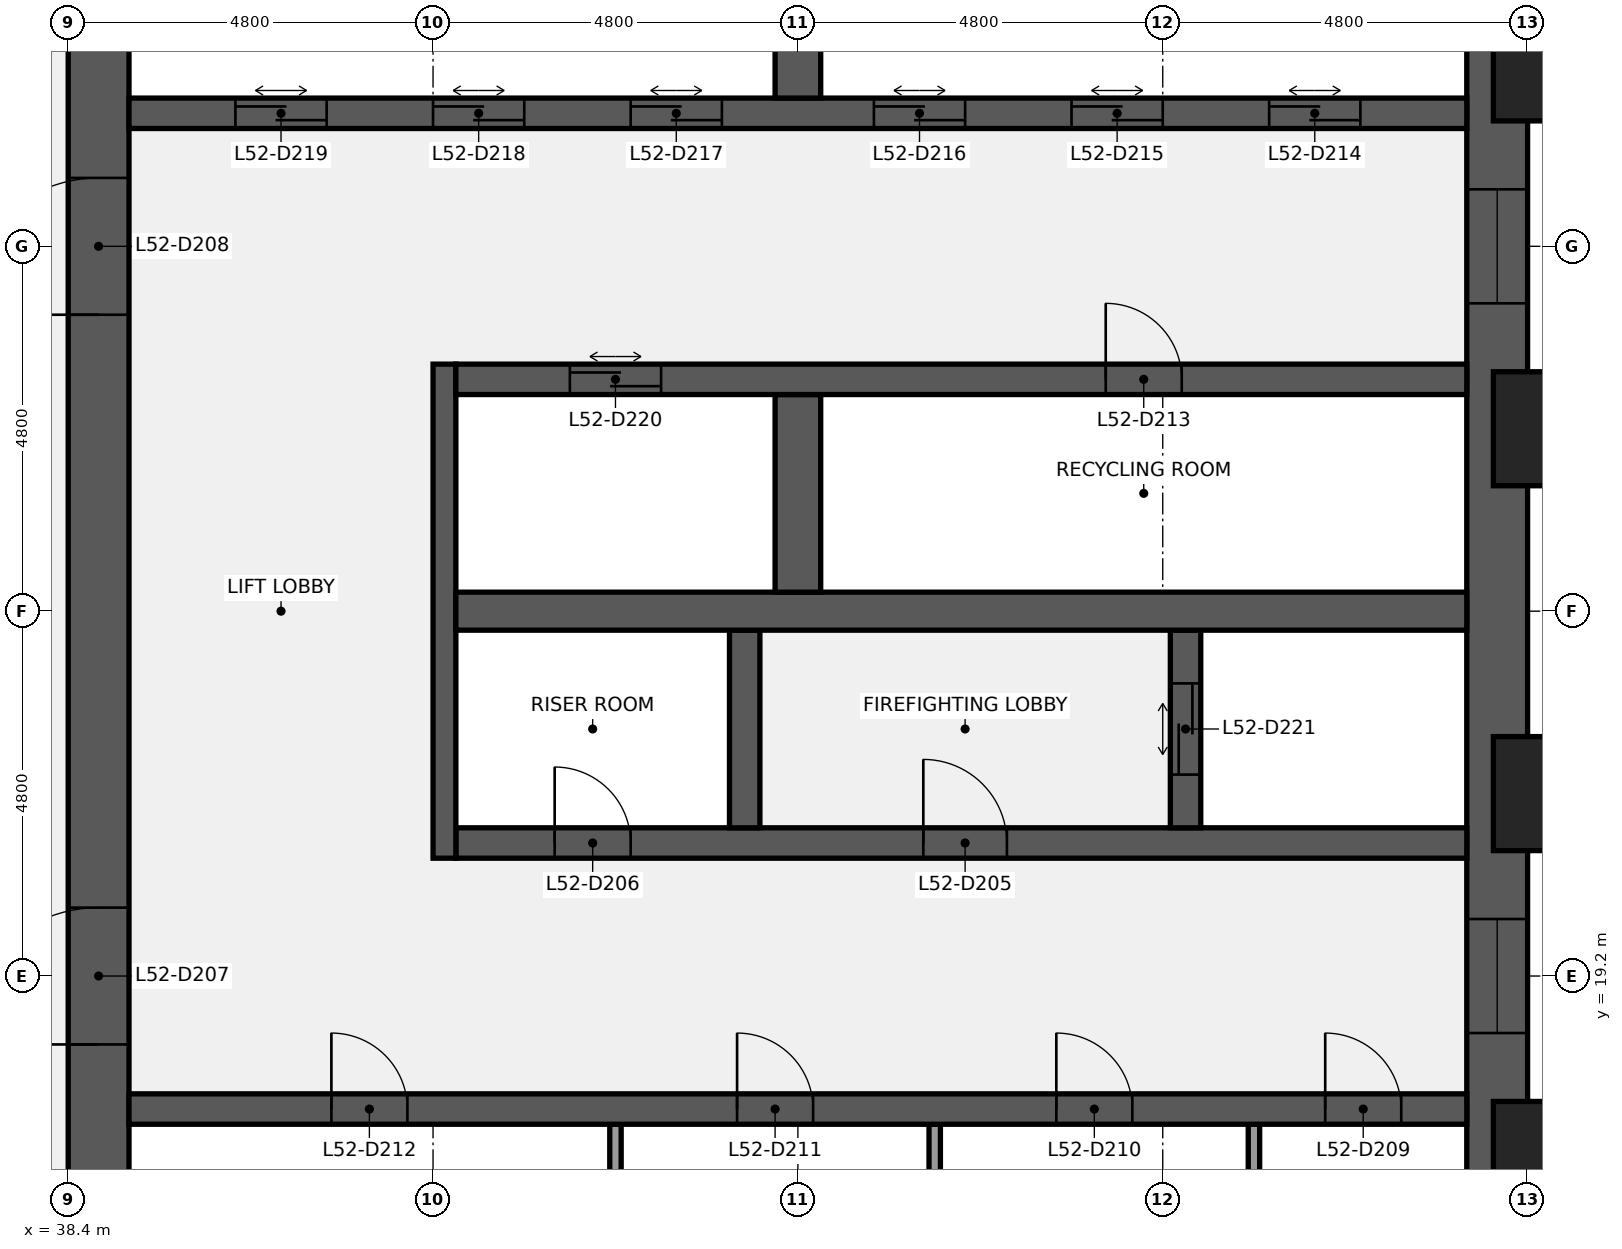
"""IFC4 building model, lengths in metres.
Left out: names, types, materials, properties, quantities, classifications, styles, units other than length and angle.
Written with IfcOpenShell. Run it as: python <this file> out.ifc"""

import sys

from ifc_helpers import new_model, si_unit, direction, frame, frame_2d, origin, origin_2d, place, context, subcontext, project, spatial, rectangle, extrude, element, fill, save


model = new_model("IFC4")
c1 = context("Model", 3, precision=1e-05, world=origin(), true_north=direction((0.0, 1.0)))
c2 = subcontext(c1, "Body", "Model", "MODEL_VIEW")
j1 = project(units=[si_unit("LENGTHUNIT", "METRE"), si_unit("PLANEANGLEUNIT", "RADIAN")], contexts=[c1])
p1 = place(None, origin())
s1 = spatial("IfcSite", under=j1, at=p1, CompositionType="ELEMENT")
p2 = place(p1, origin())
s2 = spatial("IfcBuilding", under=s1, at=p2, CompositionType="ELEMENT")
p3 = place(p2, frame((0.0, 0.0, 237.2)))
s3 = spatial("IfcBuildingStorey", under=s2, at=p3, CompositionType="ELEMENT", Elevation=237.2)
p4 = place(p3, frame((57.2, 38.4, 0.0), z_axis=(0.0, 0.0, 1.0), x_axis=(0.0, -1.0, 0.0)))
e1 = element("IfcWall", 1, at=p4, inside=s3, PredefinedType="SHEAR", context=c2, shape_type="SweptSolid", body=[
    extrude(rectangle(XDim=28.8, YDim=0.8, at=frame_2d((14.4, 0.0))), origin(), (0.0, 0.0, 1.0), 3.84),
])
p5 = place(p4, frame((18.45, 0.0, 0.9)))
e2 = element("IfcOpeningElement", 2, at=p5, cuts=e1, PredefinedType="OPENING", context=c2, shape_type="SweptSolid", body=[
    extrude(rectangle(XDim=1.5, YDim=1.5, at=frame_2d((0.75, 0.75))), frame((0.0, 0.41, 0.0), z_axis=(0.0, -1.0, 0.0), x_axis=(1.0, 0.0, 0.0)), (0.0, 0.0, 1.0), 0.82),
])
p6 = place(p4, frame((8.85, 0.0, 0.9)))
e3 = element("IfcOpeningElement", 3, at=p6, cuts=e1, PredefinedType="OPENING", context=c2, shape_type="SweptSolid", body=[
    extrude(rectangle(XDim=1.5, YDim=1.5, at=frame_2d((0.75, 0.75))), frame((0.0, 0.41, 0.0), z_axis=(0.0, -1.0, 0.0), x_axis=(1.0, 0.0, 0.0)), (0.0, 0.0, 1.0), 0.82),
])
p7 = place(p3, frame((38.8, 9.6, 0.0), z_axis=(0.0, 0.0, 1.0), x_axis=(0.0, 1.0, 0.0)))
e4 = element("IfcWall", 4, at=p7, inside=s3, PredefinedType="SHEAR", context=c2, shape_type="SweptSolid", body=[
    extrude(rectangle(XDim=28.8, YDim=0.8, at=frame_2d((14.4, 0.0))), origin(), (0.0, 0.0, 1.0), 3.84),
])
p8 = place(p7, frame((8.7, 0.0, 0.0)))
e5 = element("IfcOpeningElement", 5, at=p8, cuts=e4, PredefinedType="OPENING", context=c2, shape_type="SweptSolid", body=[
    extrude(rectangle(XDim=1.8, YDim=2.1, at=frame_2d((0.9, 1.05))), frame((0.0, 0.41, 0.0), z_axis=(0.0, -1.0, 0.0), x_axis=(1.0, 0.0, 0.0)), (0.0, 0.0, 1.0), 0.82),
])
p9 = place(p7, frame((18.3, 0.0, 0.0)))
e6 = element("IfcOpeningElement", 6, at=p9, cuts=e4, PredefinedType="OPENING", context=c2, shape_type="SweptSolid", body=[
    extrude(rectangle(XDim=1.8, YDim=2.1, at=frame_2d((0.9, 1.05))), frame((0.0, 0.41, 0.0), z_axis=(0.0, -1.0, 0.0), x_axis=(1.0, 0.0, 0.0)), (0.0, 0.0, 1.0), 0.82),
])
for number, where, z_axis, x_axis in (
    (7, (54.0, 14.65, 0.0), (0.0, 0.0, 1.0), (0.0, 1.0, 0.0)),
    (8, (49.8, 14.65, 0.0), (0.0, 0.0, 1.0), (0.0, 1.0, 0.0)),
    (9, (45.6, 14.65, 0.0), (0.0, 0.0, 1.0), (0.0, 1.0, 0.0)),
):
    element("IfcWall", number, at=place(p3, frame(where, z_axis=z_axis, x_axis=x_axis)), inside=s3, PredefinedType="PARTITIONING", context=c2, shape_type="SweptSolid", body=[
        extrude(rectangle(XDim=2.6, YDim=0.15, at=frame_2d((1.3, 0.0))), origin(), (0.0, 0.0, 1.0), 3.84),
    ])
p10 = place(p3, frame((39.2, 17.45, 0.0), z_axis=(0.0, 0.0, 1.0), x_axis=(1.0, 0.0, 0.0)))
e10 = element("IfcWall", 10, at=p10, inside=s3, PredefinedType="SHEAR", context=c2, shape_type="SweptSolid", body=[
    extrude(rectangle(XDim=17.6, YDim=0.4, at=frame_2d((8.8, 0.0))), origin(), (0.0, 0.0, 1.0), 3.84),
])
p11 = place(p10, frame((15.738, 0.0, 0.0)))
e11 = element("IfcOpeningElement", 11, at=p11, cuts=e10, PredefinedType="OPENING", context=c2, shape_type="SweptSolid", body=[
    extrude(rectangle(XDim=1.0, YDim=2.1, at=frame_2d((0.5, 1.05))), frame((0.0, 0.21, 0.0), z_axis=(0.0, -1.0, 0.0), x_axis=(1.0, 0.0, 0.0)), (0.0, 0.0, 1.0), 0.42),
])
p12 = place(p10, frame((12.2, 0.0, 0.0)))
e12 = element("IfcOpeningElement", 12, at=p12, cuts=e10, PredefinedType="OPENING", context=c2, shape_type="SweptSolid", body=[
    extrude(rectangle(XDim=1.0, YDim=2.1, at=frame_2d((0.5, 1.05))), frame((0.0, 0.21, 0.0), z_axis=(0.0, -1.0, 0.0), x_axis=(1.0, 0.0, 0.0)), (0.0, 0.0, 1.0), 0.42),
])
p13 = place(p10, frame((8.0, 0.0, 0.0)))
e13 = element("IfcOpeningElement", 13, at=p13, cuts=e10, PredefinedType="OPENING", context=c2, shape_type="SweptSolid", body=[
    extrude(rectangle(XDim=1.0, YDim=2.1, at=frame_2d((0.5, 1.05))), frame((0.0, 0.21, 0.0), z_axis=(0.0, -1.0, 0.0), x_axis=(1.0, 0.0, 0.0)), (0.0, 0.0, 1.0), 0.42),
])
p14 = place(p10, frame((2.663, 0.0, 0.0)))
e14 = element("IfcOpeningElement", 14, at=p14, cuts=e10, PredefinedType="OPENING", context=c2, shape_type="SweptSolid", body=[
    extrude(rectangle(XDim=1.0, YDim=2.1, at=frame_2d((0.5, 1.05))), frame((0.0, 0.21, 0.0), z_axis=(0.0, -1.0, 0.0), x_axis=(1.0, 0.0, 0.0)), (0.0, 0.0, 1.0), 0.42),
])
p15 = place(p3, frame((43.5, 20.95, 0.0), z_axis=(0.0, 0.0, 1.0), x_axis=(1.0, 0.0, 0.0)))
e15 = element("IfcWall", 15, at=p15, inside=s3, PredefinedType="SHEAR", context=c2, shape_type="SweptSolid", body=[
    extrude(rectangle(XDim=13.3, YDim=0.4, at=frame_2d((6.65, 0.0))), origin(), (0.0, 0.0, 1.0), 3.84),
])
p16 = place(p15, frame((6.15, 0.0, 0.0)))
e16 = element("IfcOpeningElement", 16, at=p16, cuts=e15, PredefinedType="OPENING", context=c2, shape_type="SweptSolid", body=[
    extrude(rectangle(XDim=1.1, YDim=2.1, at=frame_2d((0.55, 1.05))), frame((0.0, 0.21, 0.0), z_axis=(0.0, -1.0, 0.0), x_axis=(1.0, 0.0, 0.0)), (0.0, 0.0, 1.0), 0.42),
])
p17 = place(p15, frame((1.3, 0.0, 0.0)))
e17 = element("IfcOpeningElement", 17, at=p17, cuts=e15, PredefinedType="OPENING", context=c2, shape_type="SweptSolid", body=[
    extrude(rectangle(XDim=1.0, YDim=2.1, at=frame_2d((0.5, 1.05))), frame((0.0, 0.21, 0.0), z_axis=(0.0, -1.0, 0.0), x_axis=(1.0, 0.0, 0.0)), (0.0, 0.0, 1.0), 0.42),
])
p18 = place(p3, frame((43.35, 20.75, 0.0), z_axis=(0.0, 0.0, 1.0), x_axis=(0.0, 1.0, 0.0)))
e18 = element("IfcWall", 18, at=p18, inside=s3, PredefinedType="SHEAR", context=c2, shape_type="SweptSolid", body=[
    extrude(rectangle(XDim=6.5, YDim=0.3, at=frame_2d((3.25, 0.0))), origin(), (0.0, 0.0, 1.0), 3.84),
])
p19 = place(p3, frame((53.1, 21.15, 0.0), z_axis=(0.0, 0.0, 1.0), x_axis=(0.0, 1.0, 0.0)))
e19 = element("IfcWall", 19, at=p19, inside=s3, PredefinedType="SHEAR", context=c2, shape_type="SweptSolid", body=[
    extrude(rectangle(XDim=2.6, YDim=0.4, at=frame_2d((1.3, 0.0))), origin(), (0.0, 0.0, 1.0), 3.84),
])
p20 = place(p19, frame((0.7, 0.0, 0.0)))
e20 = element("IfcOpeningElement", 20, at=p20, cuts=e19, PredefinedType="OPENING", context=c2, shape_type="SweptSolid", body=[
    extrude(rectangle(XDim=1.2, YDim=2.1, at=frame_2d((0.6, 1.05))), frame((0.0, 0.21, 0.0), z_axis=(0.0, -1.0, 0.0), x_axis=(1.0, 0.0, 0.0)), (0.0, 0.0, 1.0), 0.42),
])
p21 = place(p3, frame((47.3, 21.15, 0.0), z_axis=(0.0, 0.0, 1.0), x_axis=(0.0, 1.0, 0.0)))
e21 = element("IfcWall", 21, at=p21, inside=s3, PredefinedType="SHEAR", context=c2, shape_type="SweptSolid", body=[
    extrude(rectangle(XDim=2.6, YDim=0.4, at=frame_2d((1.3, 0.0))), origin(), (0.0, 0.0, 1.0), 3.84),
])
p22 = place(p3, frame((43.5, 24.0, 0.0), z_axis=(0.0, 0.0, 1.0), x_axis=(1.0, 0.0, 0.0)))
e22 = element("IfcWall", 22, at=p22, inside=s3, PredefinedType="SHEAR", context=c2, shape_type="SweptSolid", body=[
    extrude(rectangle(XDim=13.3, YDim=0.5, at=frame_2d((6.65, 0.0))), origin(), (0.0, 0.0, 1.0), 3.84),
])
p23 = place(p3, frame((48.0, 24.25, 0.0), z_axis=(0.0, 0.0, 1.0), x_axis=(0.0, 1.0, 0.0)))
e23 = element("IfcWall", 23, at=p23, inside=s3, PredefinedType="SHEAR", context=c2, shape_type="SweptSolid", body=[
    extrude(rectangle(XDim=2.6, YDim=0.6, at=frame_2d((1.3, 0.0))), origin(), (0.0, 0.0, 1.0), 3.84),
])
p24 = place(p3, frame((43.5, 27.05, 0.0), z_axis=(0.0, 0.0, 1.0), x_axis=(1.0, 0.0, 0.0)))
e24 = element("IfcWall", 24, at=p24, inside=s3, PredefinedType="SHEAR", context=c2, shape_type="SweptSolid", body=[
    extrude(rectangle(XDim=13.3, YDim=0.4, at=frame_2d((6.65, 0.0))), origin(), (0.0, 0.0, 1.0), 3.84),
])
p25 = place(p24, frame((8.55, 0.0, 0.0)))
e25 = element("IfcOpeningElement", 25, at=p25, cuts=e24, PredefinedType="OPENING", context=c2, shape_type="SweptSolid", body=[
    extrude(rectangle(XDim=1.0, YDim=2.1, at=frame_2d((0.5, 1.05))), frame((0.0, 0.21, 0.0), z_axis=(0.0, -1.0, 0.0), x_axis=(1.0, 0.0, 0.0)), (0.0, 0.0, 1.0), 0.42),
])
p26 = place(p24, frame((1.5, 0.0, 0.0)))
e26 = element("IfcOpeningElement", 26, at=p26, cuts=e24, PredefinedType="OPENING", context=c2, shape_type="SweptSolid", body=[
    extrude(rectangle(XDim=1.2, YDim=2.1, at=frame_2d((0.6, 1.05))), frame((0.0, 0.21, 0.0), z_axis=(0.0, -1.0, 0.0), x_axis=(1.0, 0.0, 0.0)), (0.0, 0.0, 1.0), 0.42),
])
p27 = place(p3, frame((39.2, 30.55, 0.0), z_axis=(0.0, 0.0, 1.0), x_axis=(1.0, 0.0, 0.0)))
e27 = element("IfcWall", 27, at=p27, inside=s3, PredefinedType="SHEAR", context=c2, shape_type="SweptSolid", body=[
    extrude(rectangle(XDim=17.6, YDim=0.4, at=frame_2d((8.8, 0.0))), origin(), (0.0, 0.0, 1.0), 3.84),
])
p28 = place(p27, frame((15.0, 0.0, 0.0)))
e28 = element("IfcOpeningElement", 28, at=p28, cuts=e27, PredefinedType="OPENING", context=c2, shape_type="SweptSolid", body=[
    extrude(rectangle(XDim=1.2, YDim=2.1, at=frame_2d((0.6, 1.05))), frame((0.0, 0.21, 0.0), z_axis=(0.0, -1.0, 0.0), x_axis=(1.0, 0.0, 0.0)), (0.0, 0.0, 1.0), 0.42),
])
p29 = place(p27, frame((12.4, 0.0, 0.0)))
e29 = element("IfcOpeningElement", 29, at=p29, cuts=e27, PredefinedType="OPENING", context=c2, shape_type="SweptSolid", body=[
    extrude(rectangle(XDim=1.2, YDim=2.1, at=frame_2d((0.6, 1.05))), frame((0.0, 0.21, 0.0), z_axis=(0.0, -1.0, 0.0), x_axis=(1.0, 0.0, 0.0)), (0.0, 0.0, 1.0), 0.42),
])
p30 = place(p27, frame((9.8, 0.0, 0.0)))
e30 = element("IfcOpeningElement", 30, at=p30, cuts=e27, PredefinedType="OPENING", context=c2, shape_type="SweptSolid", body=[
    extrude(rectangle(XDim=1.2, YDim=2.1, at=frame_2d((0.6, 1.05))), frame((0.0, 0.21, 0.0), z_axis=(0.0, -1.0, 0.0), x_axis=(1.0, 0.0, 0.0)), (0.0, 0.0, 1.0), 0.42),
])
p31 = place(p27, frame((6.6, 0.0, 0.0)))
e31 = element("IfcOpeningElement", 31, at=p31, cuts=e27, PredefinedType="OPENING", context=c2, shape_type="SweptSolid", body=[
    extrude(rectangle(XDim=1.2, YDim=2.1, at=frame_2d((0.6, 1.05))), frame((0.0, 0.21, 0.0), z_axis=(0.0, -1.0, 0.0), x_axis=(1.0, 0.0, 0.0)), (0.0, 0.0, 1.0), 0.42),
])
p32 = place(p27, frame((4.0, 0.0, 0.0)))
e32 = element("IfcOpeningElement", 32, at=p32, cuts=e27, PredefinedType="OPENING", context=c2, shape_type="SweptSolid", body=[
    extrude(rectangle(XDim=1.2, YDim=2.1, at=frame_2d((0.6, 1.05))), frame((0.0, 0.21, 0.0), z_axis=(0.0, -1.0, 0.0), x_axis=(1.0, 0.0, 0.0)), (0.0, 0.0, 1.0), 0.42),
])
p33 = place(p27, frame((1.4, 0.0, 0.0)))
e33 = element("IfcOpeningElement", 33, at=p33, cuts=e27, PredefinedType="OPENING", context=c2, shape_type="SweptSolid", body=[
    extrude(rectangle(XDim=1.2, YDim=2.1, at=frame_2d((0.6, 1.05))), frame((0.0, 0.21, 0.0), z_axis=(0.0, -1.0, 0.0), x_axis=(1.0, 0.0, 0.0)), (0.0, 0.0, 1.0), 0.42),
])
p34 = place(p3, frame((48.0, 30.75, 0.0), z_axis=(0.0, 0.0, 1.0), x_axis=(0.0, 1.0, 0.0)))
e34 = element("IfcWall", 34, at=p34, inside=s3, PredefinedType="SHEAR", context=c2, shape_type="SweptSolid", body=[
    extrude(rectangle(XDim=2.6, YDim=0.6, at=frame_2d((1.3, 0.0))), origin(), (0.0, 0.0, 1.0), 3.84),
])
for number, where, z_axis, x_axis in (
    (35, (58.35, 16.8, 0.0), (0.0, 0.0, 1.0), (0.0, 1.0, 0.0)),
    (36, (58.35, 21.6, 0.0), (0.0, 0.0, 1.0), (0.0, 1.0, 0.0)),
    (37, (58.35, 26.4, 0.0), (0.0, 0.0, 1.0), (0.0, 1.0, 0.0)),
    (38, (58.35, 31.2, 0.0), (0.0, 0.0, 1.0), (0.0, 1.0, 0.0)),
):
    element("IfcColumn", number, at=place(p3, frame(where, z_axis=z_axis, x_axis=x_axis)), inside=s3, PredefinedType="PILASTER", context=c2, shape_type="SweptSolid", body=[
        extrude(rectangle(XDim=2.4, YDim=1.5, at=origin_2d()), origin(), (0.0, 0.0, 1.0), 4.0),
    ])
p35 = place(p16, origin())
e39 = element("IfcDoor", 39, at=p35, inside=s3, OperationType="SINGLE_SWING_LEFT", PredefinedType="DOOR", context=c2, shape_type="SweptSolid", body=[
    extrude(rectangle(XDim=1.1, YDim=2.1, at=frame_2d((0.55, 1.05))), frame((0.0, 0.025, 0.0), z_axis=(0.0, -1.0, 0.0), x_axis=(1.0, 0.0, 0.0)), (0.0, 0.0, 1.0), 0.05),
])
fill(e16, e39)
p36 = place(p17, origin())
e40 = element("IfcDoor", 40, at=p36, inside=s3, OperationType="SINGLE_SWING_LEFT", PredefinedType="DOOR", context=c2, shape_type="SweptSolid", body=[
    extrude(rectangle(XDim=1.0, YDim=2.1, at=frame_2d((0.5, 1.05))), frame((0.0, 0.025, 0.0), z_axis=(0.0, -1.0, 0.0), x_axis=(1.0, 0.0, 0.0)), (0.0, 0.0, 1.0), 0.05),
])
fill(e17, e40)
p37 = place(p8, origin())
e41 = element("IfcDoor", 41, at=p37, inside=s3, OperationType="DOUBLE_DOOR_SINGLE_SWING", PredefinedType="DOOR", context=c2, shape_type="SweptSolid", body=[
    extrude(rectangle(XDim=1.8, YDim=2.1, at=frame_2d((0.9, 1.05))), frame((0.0, 0.025, 0.0), z_axis=(0.0, -1.0, 0.0), x_axis=(1.0, 0.0, 0.0)), (0.0, 0.0, 1.0), 0.05),
])
fill(e5, e41)
p38 = place(p9, origin())
e42 = element("IfcDoor", 42, at=p38, inside=s3, OperationType="DOUBLE_DOOR_SINGLE_SWING", PredefinedType="DOOR", context=c2, shape_type="SweptSolid", body=[
    extrude(rectangle(XDim=1.8, YDim=2.1, at=frame_2d((0.9, 1.05))), frame((0.0, 0.025, 0.0), z_axis=(0.0, -1.0, 0.0), x_axis=(1.0, 0.0, 0.0)), (0.0, 0.0, 1.0), 0.05),
])
fill(e6, e42)
p39 = place(p11, origin())
e43 = element("IfcDoor", 43, at=p39, inside=s3, OperationType="SINGLE_SWING_LEFT", PredefinedType="DOOR", context=c2, shape_type="SweptSolid", body=[
    extrude(rectangle(XDim=1.0, YDim=2.1, at=frame_2d((0.5, 1.05))), frame((0.0, 0.025, 0.0), z_axis=(0.0, -1.0, 0.0), x_axis=(1.0, 0.0, 0.0)), (0.0, 0.0, 1.0), 0.05),
])
fill(e11, e43)
p40 = place(p12, origin())
e44 = element("IfcDoor", 44, at=p40, inside=s3, OperationType="SINGLE_SWING_LEFT", PredefinedType="DOOR", context=c2, shape_type="SweptSolid", body=[
    extrude(rectangle(XDim=1.0, YDim=2.1, at=frame_2d((0.5, 1.05))), frame((0.0, 0.025, 0.0), z_axis=(0.0, -1.0, 0.0), x_axis=(1.0, 0.0, 0.0)), (0.0, 0.0, 1.0), 0.05),
])
fill(e12, e44)
p41 = place(p13, origin())
e45 = element("IfcDoor", 45, at=p41, inside=s3, OperationType="SINGLE_SWING_LEFT", PredefinedType="DOOR", context=c2, shape_type="SweptSolid", body=[
    extrude(rectangle(XDim=1.0, YDim=2.1, at=frame_2d((0.5, 1.05))), frame((0.0, 0.025, 0.0), z_axis=(0.0, -1.0, 0.0), x_axis=(1.0, 0.0, 0.0)), (0.0, 0.0, 1.0), 0.05),
])
fill(e13, e45)
p42 = place(p14, origin())
e46 = element("IfcDoor", 46, at=p42, inside=s3, OperationType="SINGLE_SWING_LEFT", PredefinedType="DOOR", context=c2, shape_type="SweptSolid", body=[
    extrude(rectangle(XDim=1.0, YDim=2.1, at=frame_2d((0.5, 1.05))), frame((0.0, 0.025, 0.0), z_axis=(0.0, -1.0, 0.0), x_axis=(1.0, 0.0, 0.0)), (0.0, 0.0, 1.0), 0.05),
])
fill(e14, e46)
p43 = place(p25, origin())
e47 = element("IfcDoor", 47, at=p43, inside=s3, OperationType="SINGLE_SWING_LEFT", PredefinedType="DOOR", context=c2, shape_type="SweptSolid", body=[
    extrude(rectangle(XDim=1.0, YDim=2.1, at=frame_2d((0.5, 1.05))), frame((0.0, 0.025, 0.0), z_axis=(0.0, -1.0, 0.0), x_axis=(1.0, 0.0, 0.0)), (0.0, 0.0, 1.0), 0.05),
])
fill(e25, e47)
p44 = place(p28, origin())
e48 = element("IfcDoor", 48, at=p44, inside=s3, OperationType="DOUBLE_DOOR_SLIDING", PredefinedType="DOOR", context=c2, shape_type="SweptSolid", body=[
    extrude(rectangle(XDim=1.2, YDim=2.1, at=frame_2d((0.6, 1.05))), frame((0.0, 0.025, 0.0), z_axis=(0.0, -1.0, 0.0), x_axis=(1.0, 0.0, 0.0)), (0.0, 0.0, 1.0), 0.05),
])
fill(e28, e48)
p45 = place(p29, origin())
e49 = element("IfcDoor", 49, at=p45, inside=s3, OperationType="DOUBLE_DOOR_SLIDING", PredefinedType="DOOR", context=c2, shape_type="SweptSolid", body=[
    extrude(rectangle(XDim=1.2, YDim=2.1, at=frame_2d((0.6, 1.05))), frame((0.0, 0.025, 0.0), z_axis=(0.0, -1.0, 0.0), x_axis=(1.0, 0.0, 0.0)), (0.0, 0.0, 1.0), 0.05),
])
fill(e29, e49)
p46 = place(p30, origin())
e50 = element("IfcDoor", 50, at=p46, inside=s3, OperationType="DOUBLE_DOOR_SLIDING", PredefinedType="DOOR", context=c2, shape_type="SweptSolid", body=[
    extrude(rectangle(XDim=1.2, YDim=2.1, at=frame_2d((0.6, 1.05))), frame((0.0, 0.025, 0.0), z_axis=(0.0, -1.0, 0.0), x_axis=(1.0, 0.0, 0.0)), (0.0, 0.0, 1.0), 0.05),
])
fill(e30, e50)
p47 = place(p31, origin())
e51 = element("IfcDoor", 51, at=p47, inside=s3, OperationType="DOUBLE_DOOR_SLIDING", PredefinedType="DOOR", context=c2, shape_type="SweptSolid", body=[
    extrude(rectangle(XDim=1.2, YDim=2.1, at=frame_2d((0.6, 1.05))), frame((0.0, 0.025, 0.0), z_axis=(0.0, -1.0, 0.0), x_axis=(1.0, 0.0, 0.0)), (0.0, 0.0, 1.0), 0.05),
])
fill(e31, e51)
p48 = place(p32, origin())
e52 = element("IfcDoor", 52, at=p48, inside=s3, OperationType="DOUBLE_DOOR_SLIDING", PredefinedType="DOOR", context=c2, shape_type="SweptSolid", body=[
    extrude(rectangle(XDim=1.2, YDim=2.1, at=frame_2d((0.6, 1.05))), frame((0.0, 0.025, 0.0), z_axis=(0.0, -1.0, 0.0), x_axis=(1.0, 0.0, 0.0)), (0.0, 0.0, 1.0), 0.05),
])
fill(e32, e52)
p49 = place(p33, origin())
e53 = element("IfcDoor", 53, at=p49, inside=s3, OperationType="DOUBLE_DOOR_SLIDING", PredefinedType="DOOR", context=c2, shape_type="SweptSolid", body=[
    extrude(rectangle(XDim=1.2, YDim=2.1, at=frame_2d((0.6, 1.05))), frame((0.0, 0.025, 0.0), z_axis=(0.0, -1.0, 0.0), x_axis=(1.0, 0.0, 0.0)), (0.0, 0.0, 1.0), 0.05),
])
fill(e33, e53)
p50 = place(p26, origin())
e54 = element("IfcDoor", 54, at=p50, inside=s3, OperationType="DOUBLE_DOOR_SLIDING", PredefinedType="DOOR", context=c2, shape_type="SweptSolid", body=[
    extrude(rectangle(XDim=1.2, YDim=2.1, at=frame_2d((0.6, 1.05))), frame((0.0, 0.025, 0.0), z_axis=(0.0, -1.0, 0.0), x_axis=(1.0, 0.0, 0.0)), (0.0, 0.0, 1.0), 0.05),
])
fill(e26, e54)
p51 = place(p20, origin())
e55 = element("IfcDoor", 55, at=p51, inside=s3, OperationType="DOUBLE_DOOR_SLIDING", PredefinedType="DOOR", context=c2, shape_type="SweptSolid", body=[
    extrude(rectangle(XDim=1.2, YDim=2.1, at=frame_2d((0.6, 1.05))), frame((0.0, 0.025, 0.0), z_axis=(0.0, -1.0, 0.0), x_axis=(1.0, 0.0, 0.0)), (0.0, 0.0, 1.0), 0.05),
])
fill(e20, e55)
p52 = place(p5, origin())
e56 = element("IfcWindow", 56, at=p52, inside=s3, PartitioningType="SINGLE_PANEL", PredefinedType="WINDOW", context=c2, shape_type="SweptSolid", body=[
    extrude(rectangle(XDim=1.5, YDim=1.5, at=frame_2d((0.75, 0.75))), frame((0.0, 0.03, 0.0), z_axis=(0.0, -1.0, 0.0), x_axis=(1.0, 0.0, 0.0)), (0.0, 0.0, 1.0), 0.06),
])
fill(e2, e56)
p53 = place(p6, origin())
e57 = element("IfcWindow", 57, at=p53, inside=s3, PartitioningType="SINGLE_PANEL", PredefinedType="WINDOW", context=c2, shape_type="SweptSolid", body=[
    extrude(rectangle(XDim=1.5, YDim=1.5, at=frame_2d((0.75, 0.75))), frame((0.0, 0.03, 0.0), z_axis=(0.0, -1.0, 0.0), x_axis=(1.0, 0.0, 0.0)), (0.0, 0.0, 1.0), 0.06),
])
fill(e3, e57)
save(model, sys.argv[1])
